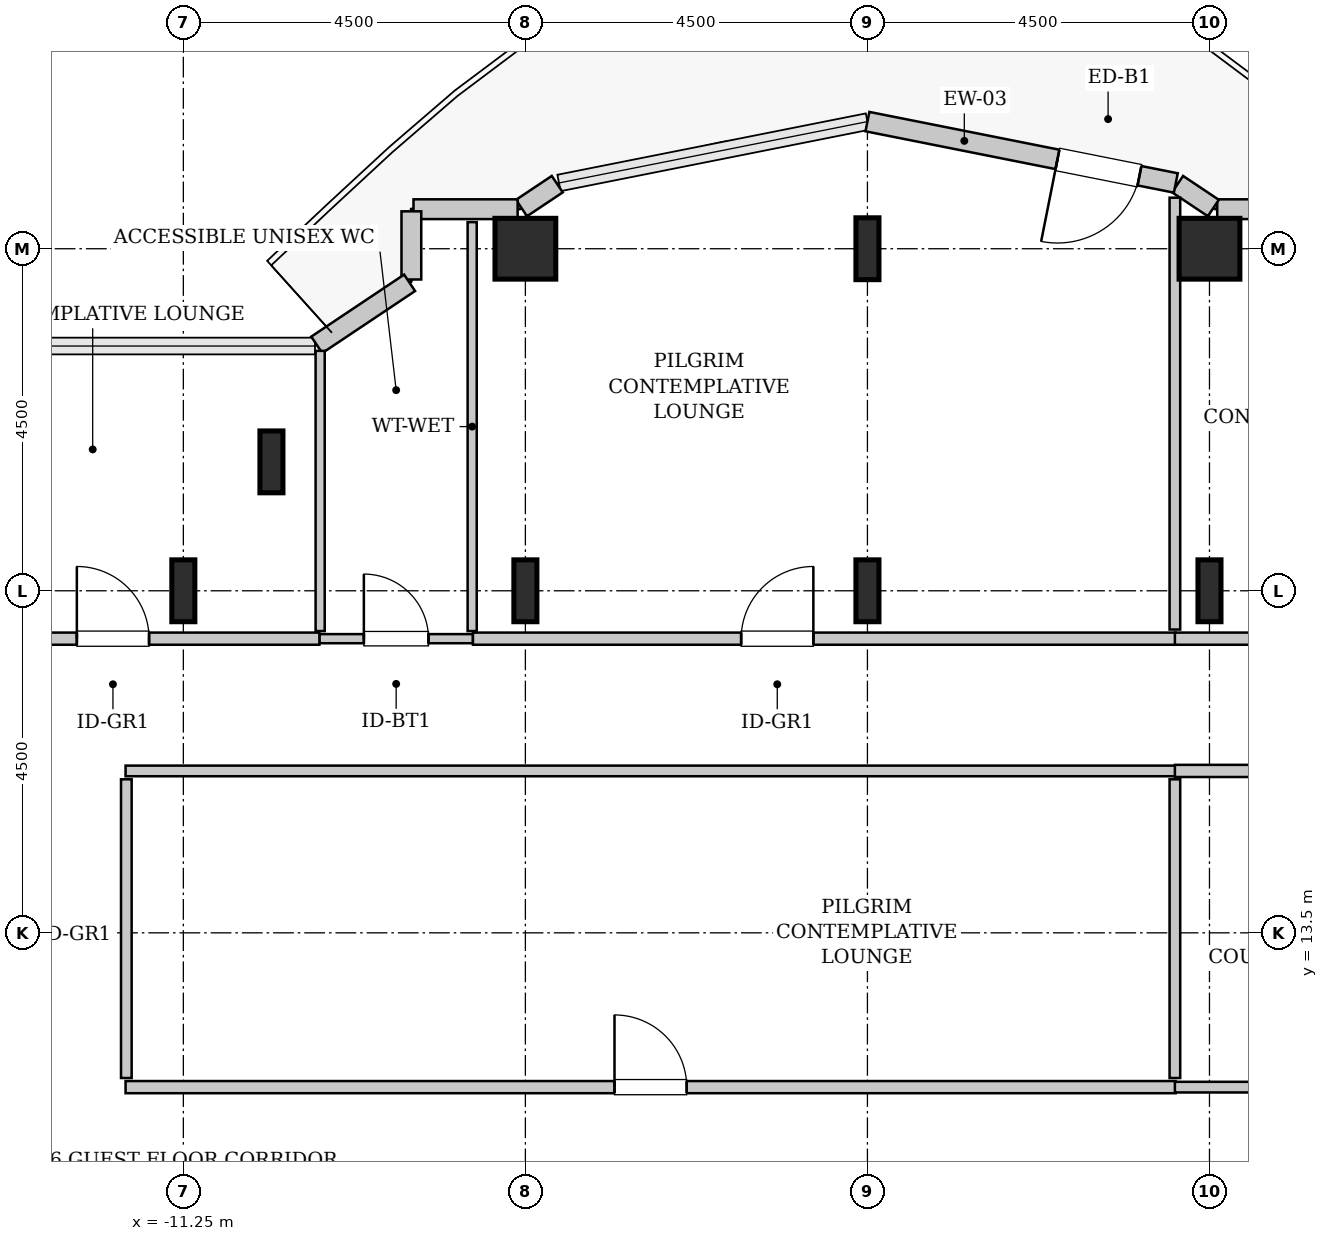
"""IFC4 building model, lengths in metres.
Left out: names, types, materials, properties, quantities, classifications, styles, units other than length and angle.
Written with IfcOpenShell. Run it as: python <this file> out.ifc"""

import sys

from ifc_helpers import new_model, si_unit, direction, frame, frame_2d, origin, origin_2d, place, context, subcontext, project, spatial, rectangle, hollow_rectangle, i_section, extrude, source, transform, mapped, element, fill, save


model = new_model("IFC4")
c1 = context("Model", 3, precision=1e-05, world=origin(), true_north=direction((0.0, 1.0)))
c2 = subcontext(c1, "Body", "Model", "MODEL_VIEW")
j1 = project(units=[si_unit("LENGTHUNIT", "METRE"), si_unit("PLANEANGLEUNIT", "RADIAN")], contexts=[c1])
p1 = place(None, origin())
s1 = spatial("IfcSite", under=j1, at=p1, CompositionType="ELEMENT")
p2 = place(p1, origin())
s2 = spatial("IfcBuilding", under=s1, at=p2, CompositionType="ELEMENT")
p3 = place(p2, frame((0.0, 0.0, 186.8)))
s3 = spatial("IfcBuildingStorey", under=s2, at=p3, CompositionType="ELEMENT", Elevation=186.8)
m1 = source(origin(), c2, "Body", "SweptSolid", [
    extrude(i_section(OverallWidth=0.303, OverallDepth=0.814, WebThickness=0.021, FlangeThickness=0.04, FilletRadius=0.03, at=origin_2d()), origin(), (0.0, 0.0, 1.0), 3.8),
])
for number, where, z_axis, x_axis in (
    (1, (-11.25, 18.0, 0.0), (0.0, 0.0, 1.0), (1.0, 0.0, 0.0)),
    (2, (-10.091, 19.696, 0.0), (0.0, 0.0, 1.0), (1.0, 0.0, 0.0)),
    (3, (-6.75, 18.0, 0.0), (0.0, 0.0, 1.0), (1.0, 0.0, 0.0)),
):
    element("IfcColumn", number, at=place(p3, frame(where, z_axis=z_axis, x_axis=x_axis)), inside=s3, PredefinedType="COLUMN", context=c2, shape_type="MappedRepresentation", body=[
        mapped(m1, transform((0.0, 0.0, 0.0), x_axis=(1.0, 0.0, 0.0), y_axis=(0.0, 1.0, 0.0), z_axis=(0.0, 0.0, 1.0), scale=1.0)),
    ])
m2 = source(origin(), c2, "Body", "SweptSolid", [
    extrude(hollow_rectangle(XDim=0.8, YDim=0.8, WallThickness=0.04, InnerFilletRadius=0.04, OuterFilletRadius=0.08, at=origin_2d()), origin(), (0.0, 0.0, 1.0), 3.8),
])
p4 = place(p3, frame((-6.75, 22.5, 0.0), z_axis=(0.0, 0.0, 1.0), x_axis=(1.0, 0.0, 0.0)))
e4 = element("IfcColumn", 4, at=p4, inside=s3, PredefinedType="COLUMN", context=c2, shape_type="MappedRepresentation", body=[
    mapped(m2, transform((0.0, 0.0, 0.0), x_axis=(1.0, 0.0, 0.0), y_axis=(0.0, 1.0, 0.0), z_axis=(0.0, 0.0, 1.0), scale=1.0)),
])
for number, where, z_axis, x_axis in (
    (5, (-2.25, 18.0, 0.0), (0.0, 0.0, 1.0), (1.0, 0.0, 0.0)),
    (6, (-2.25, 22.5, 0.0), (0.0, 0.0, 1.0), (1.0, 0.0, 0.0)),
    (7, (2.25, 18.0, 0.0), (0.0, 0.0, 1.0), (1.0, 0.0, 0.0)),
):
    element("IfcColumn", number, at=place(p3, frame(where, z_axis=z_axis, x_axis=x_axis)), inside=s3, PredefinedType="COLUMN", context=c2, shape_type="MappedRepresentation", body=[
        mapped(m1, transform((0.0, 0.0, 0.0), x_axis=(1.0, 0.0, 0.0), y_axis=(0.0, 1.0, 0.0), z_axis=(0.0, 0.0, 1.0), scale=1.0)),
    ])
p5 = place(p3, frame((2.25, 22.5, 0.0), z_axis=(0.0, 0.0, 1.0), x_axis=(1.0, 0.0, 0.0)))
e8 = element("IfcColumn", 8, at=p5, inside=s3, PredefinedType="COLUMN", context=c2, shape_type="MappedRepresentation", body=[
    mapped(m2, transform((0.0, 0.0, 0.0), x_axis=(1.0, 0.0, 0.0), y_axis=(0.0, 1.0, 0.0), z_axis=(0.0, 0.0, 1.0), scale=1.0)),
])
m3 = source(origin(), c2, "Body", "SweptSolid", [
    extrude(rectangle(XDim=1.37, YDim=0.26, at=frame_2d((0.685, 0.0))), origin(), (0.0, 0.0, 1.0), 3.55),
])
p6 = place(p3, frame((3.722, 23.02, 0.0), z_axis=(0.0, 0.0, 1.0), x_axis=(-1.0, 0.0, 0.0)))
e9 = element("IfcWall", 9, at=p6, inside=s3, PredefinedType="SOLIDWALL", context=c2, shape_type="MappedRepresentation", body=[
    mapped(m3, transform((0.0, 0.0, 0.0), x_axis=(1.0, 0.0, 0.0), y_axis=(0.0, 1.0, 0.0), z_axis=(0.0, 0.0, 1.0), scale=1.0)),
])
m4 = source(origin(), c2, "Body", "SweptSolid", [
    extrude(rectangle(XDim=0.565, YDim=0.26, at=frame_2d((0.283, 0.0))), origin(), (0.0, 0.0, 1.0), 3.55),
])
p7 = place(p3, frame((2.301, 23.036, 0.0), z_axis=(0.0, 0.0, 1.0), x_axis=(-0.831651492666, 0.555297933317, 0.0)))
e10 = element("IfcWall", 10, at=p7, inside=s3, PredefinedType="SOLIDWALL", context=c2, shape_type="MappedRepresentation", body=[
    mapped(m4, transform((0.0, 0.0, 0.0), x_axis=(1.0, 0.0, 0.0), y_axis=(0.0, 1.0, 0.0), z_axis=(0.0, 0.0, 1.0), scale=1.0)),
])
m5 = source(origin(), c2, "Body", "SweptSolid", [
    extrude(rectangle(XDim=4.137, YDim=0.26, at=frame_2d((2.068, 0.0))), origin(), (0.0, 0.0, 1.0), 3.55),
])
p8 = place(p3, frame((1.807, 23.365, 0.0), z_axis=(0.0, 0.0, 1.0), x_axis=(-0.980782170794, 0.195105954428, 0.0)))
e11 = element("IfcWall", 11, at=p8, inside=s3, PredefinedType="SOLIDWALL", context=c2, shape_type="MappedRepresentation", body=[
    mapped(m5, transform((0.0, 0.0, 0.0), x_axis=(1.0, 0.0, 0.0), y_axis=(0.0, 1.0, 0.0), z_axis=(0.0, 0.0, 1.0), scale=1.0)),
])
p9 = place(p8, frame((0.488, 0.0, 0.0)))
e12 = element("IfcOpeningElement", 12, at=p9, cuts=e11, PredefinedType="OPENING", context=c2, shape_type="SweptSolid", body=[
    extrude(rectangle(XDim=1.1, YDim=2.2, at=frame_2d((0.55, 1.1))), frame((0.0, 0.14, 0.0), z_axis=(0.0, -1.0, 0.0), x_axis=(1.0, 0.0, 0.0)), (0.0, 0.0, 1.0), 0.28),
])
p10 = place(p3, frame((-6.331, 23.35, 0.0), z_axis=(0.0, 0.0, 1.0), x_axis=(-0.831651492666, -0.555297933317, 0.0)))
e13 = element("IfcWall", 13, at=p10, inside=s3, PredefinedType="SOLIDWALL", context=c2, shape_type="MappedRepresentation", body=[
    mapped(m4, transform((0.0, 0.0, 0.0), x_axis=(1.0, 0.0, 0.0), y_axis=(0.0, 1.0, 0.0), z_axis=(0.0, 0.0, 1.0), scale=1.0)),
])
p11 = place(p3, frame((-6.852, 23.02, 0.0), z_axis=(0.0, 0.0, 1.0), x_axis=(-1.0, 0.0, 0.0)))
e14 = element("IfcWall", 14, at=p11, inside=s3, PredefinedType="SOLIDWALL", context=c2, shape_type="MappedRepresentation", body=[
    mapped(m3, transform((0.0, 0.0, 0.0), x_axis=(1.0, 0.0, 0.0), y_axis=(0.0, 1.0, 0.0), z_axis=(0.0, 0.0, 1.0), scale=1.0)),
])
m6 = source(origin(), c2, "Body", "SweptSolid", [
    extrude(rectangle(XDim=0.897, YDim=0.26, at=frame_2d((0.448, 0.0))), origin(), (0.0, 0.0, 1.0), 3.55),
])
p12 = place(p3, frame((-8.25, 22.992, 0.0), z_axis=(0.0, 0.0, 1.0), x_axis=(0.0, -1.0, 0.0)))
e15 = element("IfcWall", 15, at=p12, inside=s3, PredefinedType="SOLIDWALL", context=c2, shape_type="MappedRepresentation", body=[
    mapped(m6, transform((0.0, 0.0, 0.0), x_axis=(1.0, 0.0, 0.0), y_axis=(0.0, 1.0, 0.0), z_axis=(0.0, 0.0, 1.0), scale=1.0)),
])
m7 = source(origin(), c2, "Body", "SweptSolid", [
    extrude(rectangle(XDim=1.469, YDim=0.26, at=frame_2d((0.734, 0.0))), origin(), (0.0, 0.0, 1.0), 3.55),
])
p13 = place(p3, frame((-8.273, 22.052, 0.0), z_axis=(0.0, 0.0, 1.0), x_axis=(-0.831461760506, -0.555581983884, 0.0)))
e16 = element("IfcWall", 16, at=p13, inside=s3, PredefinedType="SOLIDWALL", context=c2, shape_type="MappedRepresentation", body=[
    mapped(m7, transform((0.0, 0.0, 0.0), x_axis=(1.0, 0.0, 0.0), y_axis=(0.0, 1.0, 0.0), z_axis=(0.0, 0.0, 1.0), scale=1.0)),
])
m8 = source(origin(), c2, "Body", "SweptSolid", [
    extrude(rectangle(XDim=2.02, YDim=0.12, at=frame_2d((1.01, 0.0))), origin(), (0.0, 0.0, 1.0), 3.535),
])
p14 = place(p3, frame((-9.46, 17.37, 0.0), z_axis=(0.0, 0.0, 1.0), x_axis=(1.0, 0.0, 0.0)))
e17 = element("IfcWall", 17, at=p14, inside=s3, PredefinedType="PLUMBINGWALL", context=c2, shape_type="MappedRepresentation", body=[
    mapped(m8, transform((0.0, 0.0, 0.0), x_axis=(1.0, 0.0, 0.0), y_axis=(0.0, 1.0, 0.0), z_axis=(0.0, 0.0, 1.0), scale=1.0)),
])
p15 = place(p14, frame((0.585, 0.0, 0.0)))
e18 = element("IfcOpeningElement", 18, at=p15, cuts=e17, PredefinedType="OPENING", context=c2, shape_type="SweptSolid", body=[
    extrude(rectangle(XDim=0.85, YDim=2.1, at=frame_2d((0.425, 1.05))), frame((0.0, 0.07, 0.0), z_axis=(0.0, -1.0, 0.0), x_axis=(1.0, 0.0, 0.0)), (0.0, 0.0, 1.0), 0.14),
])
m9 = source(origin(), c2, "Body", "SweptSolid", [
    extrude(rectangle(XDim=5.38, YDim=0.12, at=frame_2d((2.69, 0.0))), origin(), (0.0, 0.0, 1.0), 3.535),
])
p16 = place(p3, frame((-7.45, 17.47, 0.0), z_axis=(0.0, 0.0, 1.0), x_axis=(0.0, 1.0, 0.0)))
e19 = element("IfcWall", 19, at=p16, inside=s3, PredefinedType="PLUMBINGWALL", context=c2, shape_type="MappedRepresentation", body=[
    mapped(m9, transform((0.0, 0.0, 0.0), x_axis=(1.0, 0.0, 0.0), y_axis=(0.0, 1.0, 0.0), z_axis=(0.0, 0.0, 1.0), scale=1.0)),
])
m10 = source(origin(), c2, "Body", "SweptSolid", [
    extrude(rectangle(XDim=3.687, YDim=0.12, at=frame_2d((1.843, 0.0))), origin(), (0.0, 0.0, 1.0), 3.535),
])
p17 = place(p3, frame((-9.45, 17.47, 0.0), z_axis=(0.0, 0.0, 1.0), x_axis=(0.0, 1.0, 0.0)))
e20 = element("IfcWall", 20, at=p17, inside=s3, PredefinedType="PLUMBINGWALL", context=c2, shape_type="MappedRepresentation", body=[
    mapped(m10, transform((0.0, 0.0, 0.0), x_axis=(1.0, 0.0, 0.0), y_axis=(0.0, 1.0, 0.0), z_axis=(0.0, 0.0, 1.0), scale=1.0)),
])
m11 = source(origin(), c2, "Body", "SweptSolid", [
    extrude(rectangle(XDim=13.815, YDim=0.16, at=frame_2d((6.907, 0.0))), origin(), (0.0, 0.0, 1.0), 3.535),
])
p18 = place(p3, frame((-12.01, 11.47, 0.0), z_axis=(0.0, 0.0, 1.0), x_axis=(1.0, 0.0, 0.0)))
e21 = element("IfcWall", 21, at=p18, inside=s3, PredefinedType="PARTITIONING", context=c2, shape_type="MappedRepresentation", body=[
    mapped(m11, transform((0.0, 0.0, 0.0), x_axis=(1.0, 0.0, 0.0), y_axis=(0.0, 1.0, 0.0), z_axis=(0.0, 0.0, 1.0), scale=1.0)),
])
p19 = place(p18, frame((6.433, 0.0, 0.0)))
e22 = element("IfcOpeningElement", 22, at=p19, cuts=e21, PredefinedType="OPENING", context=c2, shape_type="SweptSolid", body=[
    extrude(rectangle(XDim=0.95, YDim=2.1, at=frame_2d((0.475, 1.05))), frame((0.0, 0.09, 0.0), z_axis=(0.0, -1.0, 0.0), x_axis=(1.0, 0.0, 0.0)), (0.0, 0.0, 1.0), 0.18),
])
m12 = source(origin(), c2, "Body", "SweptSolid", [
    extrude(rectangle(XDim=13.815, YDim=0.14, at=frame_2d((6.907, 0.0))), origin(), (0.0, 0.0, 1.0), 3.535),
])
p20 = place(p3, frame((-12.01, 15.63, 0.0), z_axis=(0.0, 0.0, 1.0), x_axis=(1.0, 0.0, 0.0)))
e23 = element("IfcWall", 23, at=p20, inside=s3, PredefinedType="PARTITIONING", context=c2, shape_type="MappedRepresentation", body=[
    mapped(m12, transform((0.0, 0.0, 0.0), x_axis=(1.0, 0.0, 0.0), y_axis=(0.0, 1.0, 0.0), z_axis=(0.0, 0.0, 1.0), scale=1.0)),
])
m13 = source(origin(), c2, "Body", "SweptSolid", [
    extrude(rectangle(XDim=3.93, YDim=0.14, at=frame_2d((1.965, 0.0))), origin(), (0.0, 0.0, 1.0), 3.535),
])
for number, where, z_axis, x_axis in (
    (24, (-12.0, 11.59, 0.0), (0.0, 0.0, 1.0), (0.0, 1.0, 0.0)),
    (25, (1.795, 11.59, 0.0), (0.0, 0.0, 1.0), (0.0, 1.0, 0.0)),
):
    element("IfcWall", number, at=place(p3, frame(where, z_axis=z_axis, x_axis=x_axis)), inside=s3, PredefinedType="PARTITIONING", context=c2, shape_type="MappedRepresentation", body=[
        mapped(m13, transform((0.0, 0.0, 0.0), x_axis=(1.0, 0.0, 0.0), y_axis=(0.0, 1.0, 0.0), z_axis=(0.0, 0.0, 1.0), scale=1.0)),
    ])
m14 = source(origin(), c2, "Body", "SweptSolid", [
    extrude(rectangle(XDim=9.245, YDim=0.16, at=frame_2d((4.623, 0.0))), origin(), (0.0, 0.0, 1.0), 3.535),
])
p21 = place(p3, frame((-7.44, 17.37, 0.0), z_axis=(0.0, 0.0, 1.0), x_axis=(1.0, 0.0, 0.0)))
e26 = element("IfcWall", 26, at=p21, inside=s3, PredefinedType="PARTITIONING", context=c2, shape_type="MappedRepresentation", body=[
    mapped(m14, transform((0.0, 0.0, 0.0), x_axis=(1.0, 0.0, 0.0), y_axis=(0.0, 1.0, 0.0), z_axis=(0.0, 0.0, 1.0), scale=1.0)),
])
p22 = place(p21, frame((3.529, 0.0, 0.0)))
e27 = element("IfcOpeningElement", 27, at=p22, cuts=e26, PredefinedType="OPENING", context=c2, shape_type="SweptSolid", body=[
    extrude(rectangle(XDim=0.95, YDim=2.1, at=frame_2d((0.475, 1.05))), frame((0.0, 0.09, 0.0), z_axis=(0.0, -1.0, 0.0), x_axis=(1.0, 0.0, 0.0)), (0.0, 0.0, 1.0), 0.18),
])
m15 = source(origin(), c2, "Body", "SweptSolid", [
    extrude(rectangle(XDim=5.681, YDim=0.14, at=frame_2d((2.841, 0.0))), origin(), (0.0, 0.0, 1.0), 2.875),
])
p23 = place(p3, frame((1.795, 17.49, 0.0), z_axis=(0.0, 0.0, 1.0), x_axis=(0.0, 1.0, 0.0)))
e28 = element("IfcWall", 28, at=p23, inside=s3, PredefinedType="PARTITIONING", context=c2, shape_type="MappedRepresentation", body=[
    mapped(m15, transform((0.0, 0.0, 0.0), x_axis=(1.0, 0.0, 0.0), y_axis=(0.0, 1.0, 0.0), z_axis=(0.0, 0.0, 1.0), scale=1.0)),
])
m16 = source(origin(), c2, "Body", "SweptSolid", [
    extrude(rectangle(XDim=4.16, YDim=0.16, at=frame_2d((2.08, 0.0))), origin(), (0.0, 0.0, 1.0), 3.535),
])
p24 = place(p3, frame((-13.62, 17.37, 0.0), z_axis=(0.0, 0.0, 1.0), x_axis=(1.0, 0.0, 0.0)))
e29 = element("IfcWall", 29, at=p24, inside=s3, PredefinedType="PARTITIONING", context=c2, shape_type="MappedRepresentation", body=[
    mapped(m16, transform((0.0, 0.0, 0.0), x_axis=(1.0, 0.0, 0.0), y_axis=(0.0, 1.0, 0.0), z_axis=(0.0, 0.0, 1.0), scale=1.0)),
])
p25 = place(p24, frame((0.969, 0.0, 0.0)))
e30 = element("IfcOpeningElement", 30, at=p25, cuts=e29, PredefinedType="OPENING", context=c2, shape_type="SweptSolid", body=[
    extrude(rectangle(XDim=0.95, YDim=2.1, at=frame_2d((0.475, 1.05))), frame((0.0, 0.09, 0.0), z_axis=(0.0, -1.0, 0.0), x_axis=(1.0, 0.0, 0.0)), (0.0, 0.0, 1.0), 0.18),
])
m17 = source(origin(), c2, "Body", "SweptSolid", [
    extrude(rectangle(XDim=6.61, YDim=0.16, at=frame_2d((3.305, 0.0))), origin(), (0.0, 0.0, 1.0), 3.535),
])
p26 = place(p3, frame((1.795, 17.37, 0.0), z_axis=(0.0, 0.0, 1.0), x_axis=(1.0, 0.0, 0.0)))
e31 = element("IfcWall", 31, at=p26, inside=s3, PredefinedType="PARTITIONING", context=c2, shape_type="MappedRepresentation", body=[
    mapped(m17, transform((0.0, 0.0, 0.0), x_axis=(1.0, 0.0, 0.0), y_axis=(0.0, 1.0, 0.0), z_axis=(0.0, 0.0, 1.0), scale=1.0)),
])
p27 = place(p26, frame((2.83, 0.0, 0.0)))
e32 = element("IfcOpeningElement", 32, at=p27, cuts=e31, PredefinedType="OPENING", context=c2, shape_type="SweptSolid", body=[
    extrude(rectangle(XDim=0.95, YDim=2.1, at=frame_2d((0.475, 1.05))), frame((0.0, 0.09, 0.0), z_axis=(0.0, -1.0, 0.0), x_axis=(1.0, 0.0, 0.0)), (0.0, 0.0, 1.0), 0.18),
])
p28 = place(p3, frame((1.795, 15.63, 0.0), z_axis=(0.0, 0.0, 1.0), x_axis=(1.0, 0.0, 0.0)))
e33 = element("IfcWall", 33, at=p28, inside=s3, PredefinedType="PARTITIONING", context=c2, shape_type="MappedRepresentation", body=[
    mapped(m17, transform((0.0, 0.0, 0.0), x_axis=(1.0, 0.0, 0.0), y_axis=(0.0, 1.0, 0.0), z_axis=(0.0, 0.0, 1.0), scale=1.0)),
])
p29 = place(p28, frame((2.83, 0.0, 0.0)))
e34 = element("IfcOpeningElement", 34, at=p29, cuts=e33, PredefinedType="OPENING", context=c2, shape_type="SweptSolid", body=[
    extrude(rectangle(XDim=0.95, YDim=2.1, at=frame_2d((0.475, 1.05))), frame((0.0, 0.09, 0.0), z_axis=(0.0, -1.0, 0.0), x_axis=(1.0, 0.0, 0.0)), (0.0, 0.0, 1.0), 0.18),
])
m18 = source(origin(), c2, "Body", "SweptSolid", [
    extrude(rectangle(XDim=6.61, YDim=0.14, at=frame_2d((3.305, 0.0))), origin(), (0.0, 0.0, 1.0), 3.535),
])
p30 = place(p3, frame((1.795, 11.47, 0.0), z_axis=(0.0, 0.0, 1.0), x_axis=(1.0, 0.0, 0.0)))
e35 = element("IfcWall", 35, at=p30, inside=s3, PredefinedType="PARTITIONING", context=c2, shape_type="MappedRepresentation", body=[
    mapped(m18, transform((0.0, 0.0, 0.0), x_axis=(1.0, 0.0, 0.0), y_axis=(0.0, 1.0, 0.0), z_axis=(0.0, 0.0, 1.0), scale=1.0)),
])
m19 = source(origin(), c2, "Body", "SweptSolid", [
    extrude(rectangle(XDim=1.1, YDim=2.2, at=frame_2d((0.55, 1.1))), frame((0.0, 0.025, 0.0), z_axis=(0.0, -1.0, 0.0), x_axis=(1.0, 0.0, 0.0)), (0.0, 0.0, 1.0), 0.05),
])
p31 = place(p9, origin())
e36 = element("IfcDoor", 36, at=p31, inside=s3, OperationType="SINGLE_SWING_RIGHT", PredefinedType="DOOR", context=c2, shape_type="MappedRepresentation", body=[
    mapped(m19, transform((0.0, 0.0, 0.0), x_axis=(1.0, 0.0, 0.0), y_axis=(0.0, 1.0, 0.0), z_axis=(0.0, 0.0, 1.0), scale=1.0)),
])
fill(e12, e36)
m20 = source(origin(), c2, "Body", "SweptSolid", [
    extrude(rectangle(XDim=0.85, YDim=2.1, at=frame_2d((0.425, 1.05))), frame((0.0, 0.025, 0.0), z_axis=(0.0, -1.0, 0.0), x_axis=(1.0, 0.0, 0.0)), (0.0, 0.0, 1.0), 0.05),
])
p32 = place(p15, origin())
e37 = element("IfcDoor", 37, at=p32, inside=s3, OperationType="SINGLE_SWING_LEFT", PredefinedType="DOOR", context=c2, shape_type="MappedRepresentation", body=[
    mapped(m20, transform((0.0, 0.0, 0.0), x_axis=(1.0, 0.0, 0.0), y_axis=(0.0, 1.0, 0.0), z_axis=(0.0, 0.0, 1.0), scale=1.0)),
])
fill(e18, e37)
m21 = source(origin(), c2, "Body", "SweptSolid", [
    extrude(rectangle(XDim=0.95, YDim=2.1, at=frame_2d((0.475, 1.05))), frame((0.0, 0.025, 0.0), z_axis=(0.0, -1.0, 0.0), x_axis=(1.0, 0.0, 0.0)), (0.0, 0.0, 1.0), 0.05),
])
p33 = place(p19, origin())
e38 = element("IfcDoor", 38, at=p33, inside=s3, OperationType="SINGLE_SWING_LEFT", PredefinedType="DOOR", context=c2, shape_type="MappedRepresentation", body=[
    mapped(m21, transform((0.0, 0.0, 0.0), x_axis=(1.0, 0.0, 0.0), y_axis=(0.0, 1.0, 0.0), z_axis=(0.0, 0.0, 1.0), scale=1.0)),
])
fill(e22, e38)
p34 = place(p22, origin())
e39 = element("IfcDoor", 39, at=p34, inside=s3, OperationType="SINGLE_SWING_RIGHT", PredefinedType="DOOR", context=c2, shape_type="MappedRepresentation", body=[
    mapped(m21, transform((0.0, 0.0, 0.0), x_axis=(1.0, 0.0, 0.0), y_axis=(0.0, 1.0, 0.0), z_axis=(0.0, 0.0, 1.0), scale=1.0)),
])
fill(e27, e39)
p35 = place(p25, origin())
e40 = element("IfcDoor", 40, at=p35, inside=s3, OperationType="SINGLE_SWING_LEFT", PredefinedType="DOOR", context=c2, shape_type="MappedRepresentation", body=[
    mapped(m21, transform((0.0, 0.0, 0.0), x_axis=(1.0, 0.0, 0.0), y_axis=(0.0, 1.0, 0.0), z_axis=(0.0, 0.0, 1.0), scale=1.0)),
])
fill(e30, e40)
save(model, sys.argv[1])
